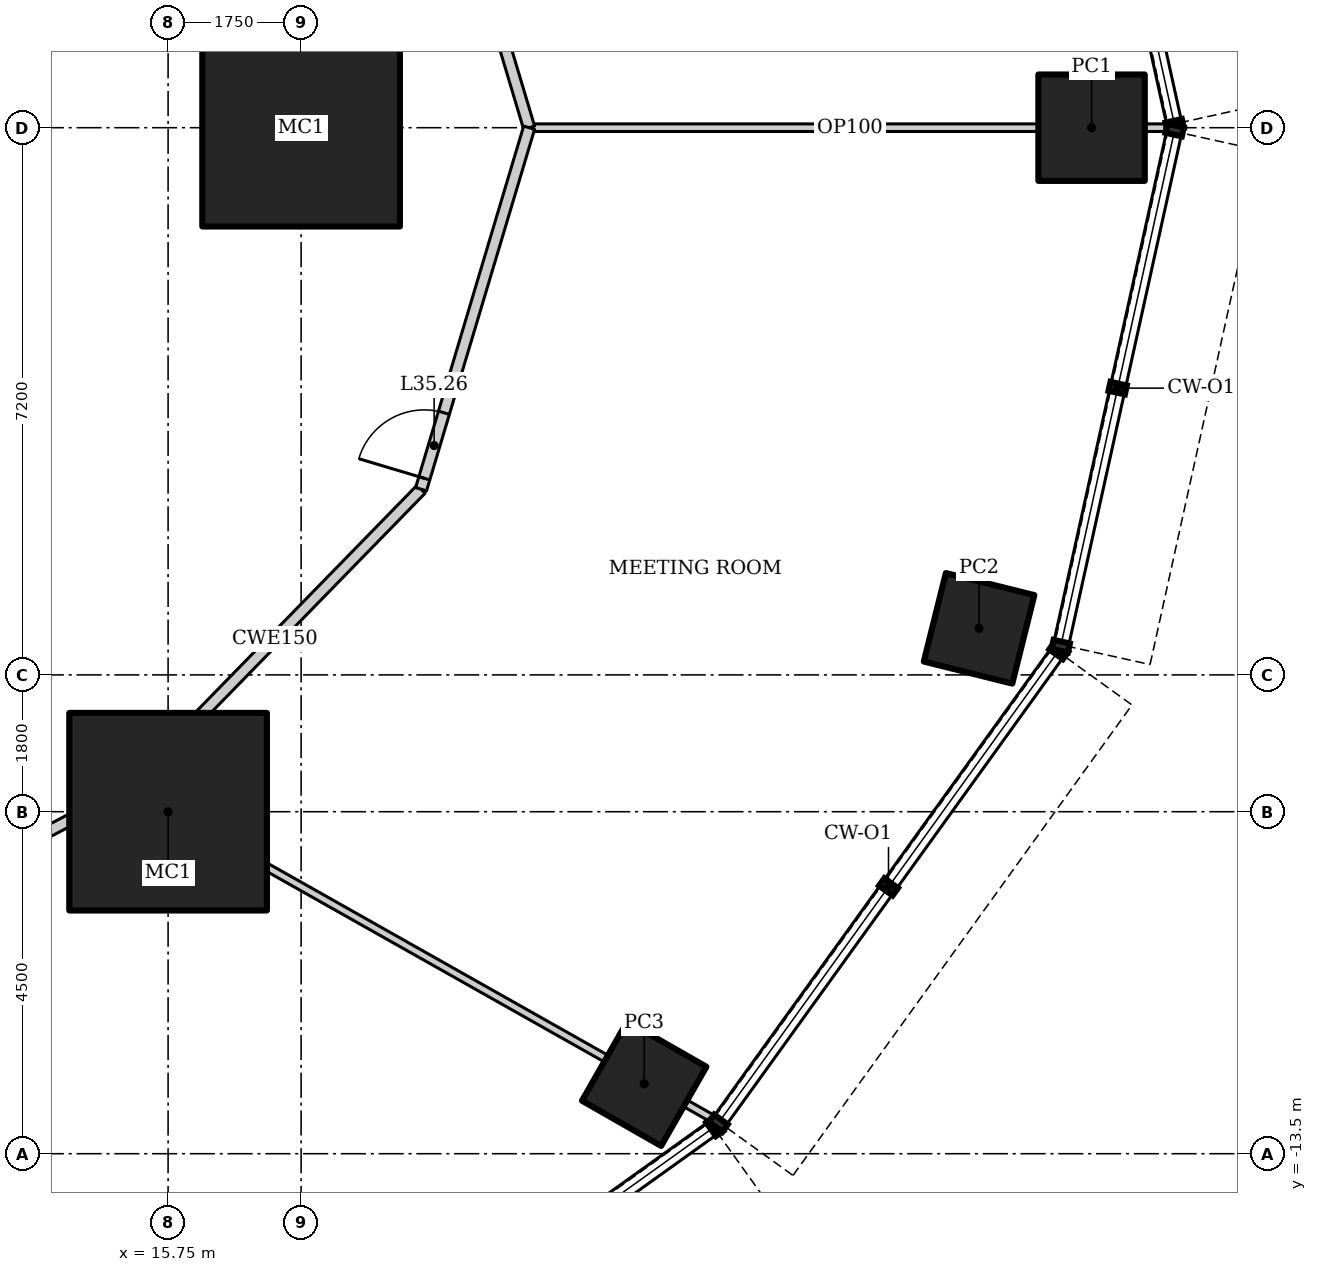
"""IFC4 building model, lengths in metres.
Left out: names, types, materials, properties, quantities, classifications, styles, units other than length and angle.
Written with IfcOpenShell. Run it as: python <this file> out.ifc"""

import sys

from ifc_helpers import new_model, si_unit, direction, frame, frame_2d, origin, origin_2d, place, context, subcontext, project, spatial, rectangle, hollow_rectangle, extrude, element, fill, save


model = new_model("IFC4")
c1 = context("Model", 3, precision=1e-05, world=origin(), true_north=direction((0.0, 1.0)))
c2 = subcontext(c1, "Body", "Model", "MODEL_VIEW")
j1 = project(units=[si_unit("LENGTHUNIT", "METRE"), si_unit("PLANEANGLEUNIT", "RADIAN")], contexts=[c1])
p1 = place(None, origin())
s1 = spatial("IfcSite", under=j1, at=p1, CompositionType="ELEMENT")
p2 = place(p1, origin())
s2 = spatial("IfcBuilding", under=s1, at=p2, CompositionType="ELEMENT")
p3 = place(p2, frame((0.0, 0.0, 151.0)))
s3 = spatial("IfcBuildingStorey", under=s2, at=p3, CompositionType="ELEMENT", Elevation=151.0)
for number, where, z_axis, x_axis in (
    (1, (17.5, 0.0, 0.0), (0.0, 0.0, 1.0), (1.0, 0.0, 0.0)),
    (2, (15.75, -9.0, 0.0), (0.0, 0.0, 1.0), (1.0, 0.0, 0.0)),
):
    element("IfcColumn", number, at=place(p3, frame(where, z_axis=z_axis, x_axis=x_axis)), inside=s3, PredefinedType="COLUMN", context=c2, shape_type="SweptSolid", body=[
        extrude(hollow_rectangle(XDim=2.6, YDim=2.6, WallThickness=0.13, at=origin_2d()), origin(), (0.0, 0.0, 1.0), 4.2),
    ])
p4 = place(p3, frame((27.9, 0.0, 0.0), z_axis=(0.0, 0.0, 1.0), x_axis=(1.0, 0.0, 0.0)))
e3 = element("IfcColumn", 3, at=p4, inside=s3, PredefinedType="COLUMN", context=c2, shape_type="SweptSolid", body=[
    extrude(hollow_rectangle(XDim=1.4, YDim=1.4, WallThickness=0.1, at=origin_2d()), origin(), (0.0, 0.0, 1.0), 4.2),
])
p5 = place(p3, frame((22.014, -12.579, 0.0), z_axis=(0.0, 0.0, 1.0), x_axis=(0.496139221777, 0.86824298017, 0.0)))
e4 = element("IfcColumn", 4, at=p5, inside=s3, PredefinedType="COLUMN", context=c2, shape_type="SweptSolid", body=[
    extrude(hollow_rectangle(XDim=1.2, YDim=1.2, WallThickness=0.12, at=origin_2d()), origin(), (0.0, 0.0, 1.0), 4.2),
])
p6 = place(p3, frame((26.42, -6.587, 0.0), z_axis=(0.0, 0.0, 1.0), x_axis=(0.2419218956, 0.970295726276, 0.0)))
e5 = element("IfcColumn", 5, at=p6, inside=s3, PredefinedType="COLUMN", context=c2, shape_type="SweptSolid", body=[
    extrude(hollow_rectangle(XDim=1.2, YDim=1.2, WallThickness=0.1, at=origin_2d()), origin(), (0.0, 0.0, 1.0), 4.2),
])
p7 = place(p3, frame((28.944, 0.0, 0.0), z_axis=(0.0, 0.0, 1.0), x_axis=(-1.0, 0.0, 0.0)))
e6 = element("IfcWall", 6, at=p7, inside=s3, PredefinedType="PARTITIONING", context=c2, shape_type="SweptSolid", body=[
    extrude(rectangle(XDim=8.444, YDim=0.1, at=frame_2d((4.222, 0.0))), origin(), (0.0, 0.0, 1.0), 3.204),
])
p8 = place(p3, frame((22.949, -13.059, 0.0), z_axis=(0.0, 0.0, 1.0), x_axis=(-0.870889908693, 0.491478144923, 0.0)))
e7 = element("IfcWall", 7, at=p8, inside=s3, PredefinedType="PARTITIONING", context=c2, shape_type="SweptSolid", body=[
    extrude(rectangle(XDim=8.865, YDim=0.1, at=frame_2d((4.432, 0.0))), origin(), (0.0, 0.0, 1.0), 3.45),
])
p9 = place(p3, frame((20.5, 0.0, 0.0), z_axis=(0.0, 0.0, 1.0), x_axis=(-0.286346182056, 0.958126225516, 0.0)))
e8 = element("IfcWall", 8, at=p9, inside=s3, PredefinedType="PARTITIONING", context=c2, shape_type="SweptSolid", body=[
    extrude(rectangle(XDim=4.965, YDim=0.15, at=frame_2d((2.482, 0.0))), origin(), (0.0, 0.0, 1.0), 4.05),
])
p10 = place(p3, frame((10.706, -11.086, 0.0), z_axis=(0.0, 0.0, 1.0), x_axis=(0.884643590306, 0.466267860924, 0.0)))
e9 = element("IfcWall", 9, at=p10, inside=s3, PredefinedType="PARTITIONING", context=c2, shape_type="SweptSolid", body=[
    extrude(rectangle(XDim=5.113, YDim=0.15, at=frame_2d((2.557, 0.0))), origin(), (0.0, 0.0, 1.0), 4.05),
])
p11 = place(p3, frame((15.229, -8.702, 0.0), z_axis=(0.0, 0.0, 1.0), x_axis=(0.698305033542, 0.715800307439, 0.0)))
e10 = element("IfcWall", 10, at=p11, inside=s3, PredefinedType="PARTITIONING", context=c2, shape_type="SweptSolid", body=[
    extrude(rectangle(XDim=5.512, YDim=0.15, at=frame_2d((2.756, 0.0))), origin(), (0.0, 0.0, 1.0), 4.05),
])
p12 = place(p3, frame((19.078, -4.757, 0.0), z_axis=(0.0, 0.0, 1.0), x_axis=(0.286346182056, 0.958126225516, 0.0)))
e11 = element("IfcWall", 11, at=p12, inside=s3, PredefinedType="PARTITIONING", context=c2, shape_type="SweptSolid", body=[
    extrude(rectangle(XDim=4.965, YDim=0.15, at=frame_2d((2.482, 0.0))), origin(), (0.0, 0.0, 1.0), 4.05),
])
p13 = place(p12, frame((0.15, 0.0, 0.0)))
e12 = element("IfcOpeningElement", 12, at=p13, cuts=e11, PredefinedType="OPENING", context=c2, shape_type="SweptSolid", body=[
    extrude(rectangle(XDim=0.9, YDim=2.1, at=frame_2d((0.45, 1.05))), frame((0.0, 0.085, 0.0), z_axis=(0.0, -1.0, 0.0), x_axis=(1.0, 0.0, 0.0)), (0.0, 0.0, 1.0), 0.17),
])
p14 = place(p13, origin())
e13 = element("IfcDoor", 13, at=p14, inside=s3, OperationType="SINGLE_SWING_LEFT", PredefinedType="DOOR", context=c2, shape_type="SweptSolid", body=[
    extrude(rectangle(XDim=0.9, YDim=2.1, at=frame_2d((0.45, 1.05))), frame((0.0, 0.025, 0.0), z_axis=(0.0, -1.0, 0.0), x_axis=(1.0, 0.0, 0.0)), (0.0, 0.0, 1.0), 0.05),
])
fill(e12, e13)
save(model, sys.argv[1])
